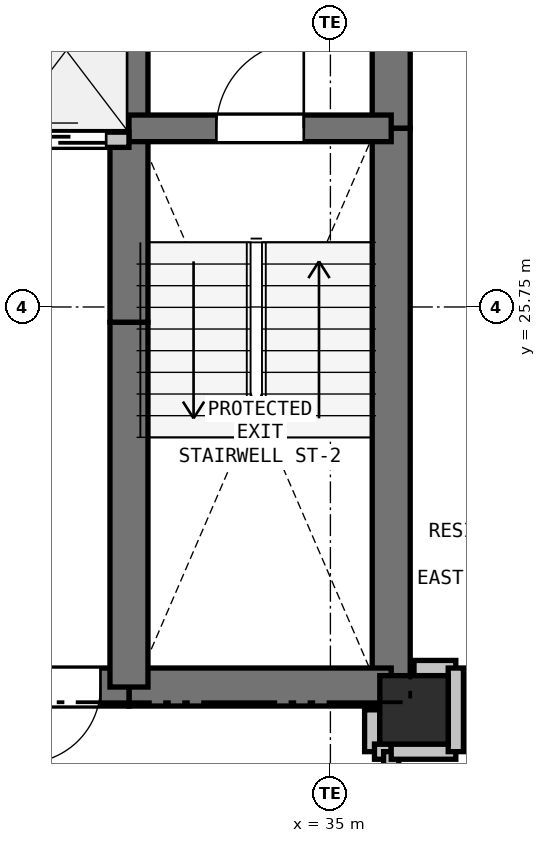
"""IFC4 building model, lengths in metres.
Left out: names, types, materials, properties, quantities, classifications, styles, units other than length and angle.
Written with IfcOpenShell. Run it as: python <this file> out.ifc"""

import sys

from ifc_helpers import new_model, si_unit, direction, frame, frame_2d, origin, origin_2d, place, context, subcontext, project, spatial, rectangle, extrude, element, fill, save


model = new_model("IFC4")
c1 = context("Model", 3, precision=1e-05, world=origin(), true_north=direction((0.0, 1.0)))
c2 = subcontext(c1, "Body", "Model", "MODEL_VIEW")
j1 = project(units=[si_unit("LENGTHUNIT", "METRE"), si_unit("PLANEANGLEUNIT", "RADIAN")], contexts=[c1])
p1 = place(None, origin())
s1 = spatial("IfcSite", under=j1, at=p1, CompositionType="ELEMENT")
p2 = place(p1, origin())
s2 = spatial("IfcBuilding", under=s1, at=p2, CompositionType="ELEMENT")
p3 = place(p2, frame((0.0, 0.0, 45.6)))
s3 = spatial("IfcBuildingStorey", under=s2, at=p3, CompositionType="ELEMENT", Elevation=45.6)
p4 = place(p3, frame((36.1, 20.45, 0.0), z_axis=(0.0, 0.0, 1.0), x_axis=(1.0, 0.0, 0.0)))
e1 = element("IfcColumn", 1, at=p4, inside=s3, PredefinedType="COLUMN", context=c2, shape_type="SweptSolid", body=[
    extrude(rectangle(XDim=0.9, YDim=0.9, at=origin_2d()), origin(), (0.0, 0.0, 1.0), 3.3),
])
p5 = place(p3, frame((35.8, 32.75, 0.0), z_axis=(0.0, 0.0, 1.0), x_axis=(0.0, -1.0, 0.0)))
e2 = element("IfcWall", 2, at=p5, inside=s3, PredefinedType="SHEAR", context=c2, shape_type="SweptSolid", body=[
    extrude(rectangle(XDim=4.65, YDim=0.5, at=frame_2d((2.325, 0.0))), origin(), (0.0, 0.0, 1.0), 3.04),
])
p6 = place(p3, frame((35.8, 28.1, 0.0), z_axis=(0.0, 0.0, 1.0), x_axis=(0.0, -1.0, 0.0)))
e3 = element("IfcWall", 3, at=p6, inside=s3, PredefinedType="SHEAR", context=c2, shape_type="SweptSolid", body=[
    extrude(rectangle(XDim=7.35, YDim=0.5, at=frame_2d((3.675, 0.0))), origin(), (0.0, 0.0, 1.0), 3.04),
])
p7 = place(p3, frame((35.8, 20.75, 0.0), z_axis=(0.0, 0.0, 1.0), x_axis=(-1.0, 0.0, 0.0)))
e4 = element("IfcWall", 4, at=p7, inside=s3, PredefinedType="SHEAR", context=c2, shape_type="SweptSolid", body=[
    extrude(rectangle(XDim=3.45, YDim=0.5, at=frame_2d((1.725, 0.0))), origin(), (0.0, 0.0, 1.0), 3.04),
])
p8 = place(p3, frame((32.35, 20.75, 0.0), z_axis=(0.0, 0.0, 1.0), x_axis=(-1.0, 0.0, 0.0)))
e5 = element("IfcWall", 5, at=p8, inside=s3, PredefinedType="SHEAR", context=c2, shape_type="SweptSolid", body=[
    extrude(rectangle(XDim=1.75, YDim=0.5, at=frame_2d((0.875, 0.0))), origin(), (0.0, 0.0, 1.0), 3.04),
])
p9 = place(p8, frame((0.375, 0.0, 0.0)))
e6 = element("IfcOpeningElement", 6, at=p9, cuts=e5, PredefinedType="OPENING", context=c2, shape_type="SweptSolid", body=[
    extrude(rectangle(XDim=1.0, YDim=2.15, at=frame_2d((0.5, 1.075))), frame((0.0, 0.26, 0.0), z_axis=(0.0, -1.0, 0.0), x_axis=(1.0, 0.0, 0.0)), (0.0, 0.0, 1.0), 0.52),
])
p10 = place(p3, frame((32.35, 20.75, 0.0), z_axis=(0.0, 0.0, 1.0), x_axis=(0.0, 1.0, 0.0)))
e7 = element("IfcWall", 7, at=p10, inside=s3, PredefinedType="SHEAR", context=c2, shape_type="SweptSolid", body=[
    extrude(rectangle(XDim=4.8, YDim=0.5, at=frame_2d((2.4, 0.0))), origin(), (0.0, 0.0, 1.0), 3.04),
])
p11 = place(p3, frame((32.35, 25.55, 0.0), z_axis=(0.0, 0.0, 1.0), x_axis=(0.0, 1.0, 0.0)))
e8 = element("IfcWall", 8, at=p11, inside=s3, PredefinedType="SHEAR", context=c2, shape_type="SweptSolid", body=[
    extrude(rectangle(XDim=2.4, YDim=0.5, at=frame_2d((1.2, 0.0))), origin(), (0.0, 0.0, 1.0), 3.04),
])
p12 = place(p3, frame((32.35, 27.95, 0.0), z_axis=(0.0, 0.0, 1.0), x_axis=(0.0, 1.0, 0.0)))
e9 = element("IfcWall", 9, at=p12, inside=s3, PredefinedType="SHEAR", context=c2, shape_type="SweptSolid", body=[
    extrude(rectangle(XDim=2.8, YDim=0.5, at=frame_2d((1.4, 0.0))), origin(), (0.0, 0.0, 1.0), 3.04),
])
p13 = place(p3, frame((32.35, 28.1, 0.0), z_axis=(0.0, 0.0, 1.0), x_axis=(1.0, 0.0, 0.0)))
e10 = element("IfcWall", 10, at=p13, inside=s3, PredefinedType="SHEAR", context=c2, shape_type="SweptSolid", body=[
    extrude(rectangle(XDim=3.45, YDim=0.35, at=frame_2d((1.725, 0.0))), origin(), (0.0, 0.0, 1.0), 3.04),
])
p14 = place(p13, frame((1.15, 0.0, 0.0)))
e11 = element("IfcOpeningElement", 11, at=p14, cuts=e10, PredefinedType="OPENING", context=c2, shape_type="SweptSolid", body=[
    extrude(rectangle(XDim=1.15, YDim=2.15, at=frame_2d((0.575, 1.075))), frame((0.0, 0.185, 0.0), z_axis=(0.0, -1.0, 0.0), x_axis=(1.0, 0.0, 0.0)), (0.0, 0.0, 1.0), 0.37),
])
p15 = place(p3, frame((27.4, 27.95, 0.0), z_axis=(0.0, 0.0, 1.0), x_axis=(1.0, 0.0, 0.0)))
e12 = element("IfcWall", 12, at=p15, inside=s3, PredefinedType="PARTITIONING", context=c2, shape_type="SweptSolid", body=[
    extrude(rectangle(XDim=4.95, YDim=0.2, at=frame_2d((2.475, 0.0))), origin(), (0.0, 0.0, 1.0), 3.04),
])
p16 = place(p15, frame((0.25, 0.0, 0.0)))
e13 = element("IfcOpeningElement", 13, at=p16, cuts=e12, PredefinedType="OPENING", context=c2, shape_type="SweptSolid", body=[
    extrude(rectangle(XDim=1.1, YDim=2.15, at=frame_2d((0.55, 1.075))), frame((0.0, 0.11, 0.0), z_axis=(0.0, -1.0, 0.0), x_axis=(1.0, 0.0, 0.0)), (0.0, 0.0, 1.0), 0.22),
])
p17 = place(p15, frame((1.9, 0.0, 0.0)))
e14 = element("IfcOpeningElement", 14, at=p17, cuts=e12, PredefinedType="OPENING", context=c2, shape_type="SweptSolid", body=[
    extrude(rectangle(XDim=1.1, YDim=2.15, at=frame_2d((0.55, 1.075))), frame((0.0, 0.11, 0.0), z_axis=(0.0, -1.0, 0.0), x_axis=(1.0, 0.0, 0.0)), (0.0, 0.0, 1.0), 0.22),
])
p18 = place(p15, frame((3.55, 0.0, 0.0)))
e15 = element("IfcOpeningElement", 15, at=p18, cuts=e12, PredefinedType="OPENING", context=c2, shape_type="SweptSolid", body=[
    extrude(rectangle(XDim=1.1, YDim=2.15, at=frame_2d((0.55, 1.075))), frame((0.0, 0.11, 0.0), z_axis=(0.0, -1.0, 0.0), x_axis=(1.0, 0.0, 0.0)), (0.0, 0.0, 1.0), 0.22),
])
p19 = place(p3, frame((35.55, 20.45, 0.0), z_axis=(0.0, 0.0, 1.0), x_axis=(0.0, -1.0, 0.0)))
e16 = element("IfcWall", 16, at=p19, inside=s3, PredefinedType="PARTITIONING", context=c2, shape_type="SweptSolid", body=[
    extrude(rectangle(XDim=0.55, YDim=0.2, at=frame_2d((0.275, 0.0))), origin(), (0.0, 0.0, 1.0), 2.488),
])
p20 = place(p3, frame((35.58, 19.9, 0.0), z_axis=(0.0, 0.0, 1.0), x_axis=(1.0, 0.0, 0.0)))
e17 = element("IfcWall", 17, at=p20, inside=s3, PredefinedType="PARTITIONING", context=c2, shape_type="SweptSolid", body=[
    extrude(rectangle(XDim=0.22, YDim=0.2, at=frame_2d((0.11, 0.0))), origin(), (0.0, 0.0, 1.0), 3.04),
])
p21 = place(p3, frame((35.8, 19.9, 0.0), z_axis=(0.0, 0.0, 1.0), x_axis=(0.0, -1.0, 0.0)))
e18 = element("IfcWall", 18, at=p21, inside=s3, PredefinedType="PARTITIONING", context=c2, shape_type="SweptSolid", body=[
    extrude(rectangle(XDim=1.75, YDim=0.2, at=frame_2d((0.875, 0.0))), origin(), (0.0, 0.0, 1.0), 3.04),
])
p22 = place(p21, frame((0.375, 0.0, 0.0)))
e19 = element("IfcOpeningElement", 19, at=p22, cuts=e18, PredefinedType="OPENING", context=c2, shape_type="SweptSolid", body=[
    extrude(rectangle(XDim=1.0, YDim=2.15, at=frame_2d((0.5, 1.075))), frame((0.0, 0.11, 0.0), z_axis=(0.0, -1.0, 0.0), x_axis=(1.0, 0.0, 0.0)), (0.0, 0.0, 1.0), 0.22),
])
p23 = place(p3, frame((36.65, 21.0, 0.0), z_axis=(0.0, 0.0, 1.0), x_axis=(-1.0, 0.0, 0.0)))
e20 = element("IfcWall", 20, at=p23, inside=s3, PredefinedType="PARTITIONING", context=c2, shape_type="SweptSolid", body=[
    extrude(rectangle(XDim=0.55, YDim=0.2, at=frame_2d((0.275, 0.0))), origin(), (0.0, 0.0, 1.0), 2.488),
])
p24 = place(p3, frame((35.8, 19.9, 0.0), z_axis=(0.0, 0.0, 1.0), x_axis=(1.0, 0.0, 0.0)))
e21 = element("IfcWall", 21, at=p24, inside=s3, PredefinedType="PARTITIONING", context=c2, shape_type="SweptSolid", body=[
    extrude(rectangle(XDim=0.85, YDim=0.2, at=frame_2d((0.425, 0.0))), origin(), (0.0, 0.0, 1.0), 2.337),
])
p25 = place(p3, frame((36.65, 19.9, 0.0), z_axis=(0.0, 0.0, 1.0), x_axis=(0.0, 1.0, 0.0)))
e22 = element("IfcWall", 22, at=p25, inside=s3, PredefinedType="PARTITIONING", context=c2, shape_type="SweptSolid", body=[
    extrude(rectangle(XDim=1.1, YDim=0.2, at=frame_2d((0.55, 0.0))), origin(), (0.0, 0.0, 1.0), 3.04),
])
p26 = place(p18, origin())
e23 = element("IfcDoor", 23, at=p26, inside=s3, OperationType="SLIDING_TO_LEFT", PredefinedType="DOOR", context=c2, shape_type="SweptSolid", body=[
    extrude(rectangle(XDim=1.1, YDim=2.15, at=frame_2d((0.55, 1.075))), frame((0.0, 0.025, 0.0), z_axis=(0.0, -1.0, 0.0), x_axis=(1.0, 0.0, 0.0)), (0.0, 0.0, 1.0), 0.05),
])
fill(e15, e23)
p27 = place(p9, origin())
e24 = element("IfcDoor", 24, at=p27, inside=s3, OperationType="SINGLE_SWING_RIGHT", PredefinedType="DOOR", context=c2, shape_type="SweptSolid", body=[
    extrude(rectangle(XDim=1.0, YDim=2.15, at=frame_2d((0.5, 1.075))), frame((0.0, 0.025, 0.0), z_axis=(0.0, -1.0, 0.0), x_axis=(1.0, 0.0, 0.0)), (0.0, 0.0, 1.0), 0.05),
])
fill(e6, e24)
p28 = place(p14, origin())
e25 = element("IfcDoor", 25, at=p28, inside=s3, OperationType="SINGLE_SWING_RIGHT", PredefinedType="DOOR", context=c2, shape_type="SweptSolid", body=[
    extrude(rectangle(XDim=1.15, YDim=2.15, at=frame_2d((0.575, 1.075))), frame((0.0, 0.025, 0.0), z_axis=(0.0, -1.0, 0.0), x_axis=(1.0, 0.0, 0.0)), (0.0, 0.0, 1.0), 0.05),
])
fill(e11, e25)
save(model, sys.argv[1])
